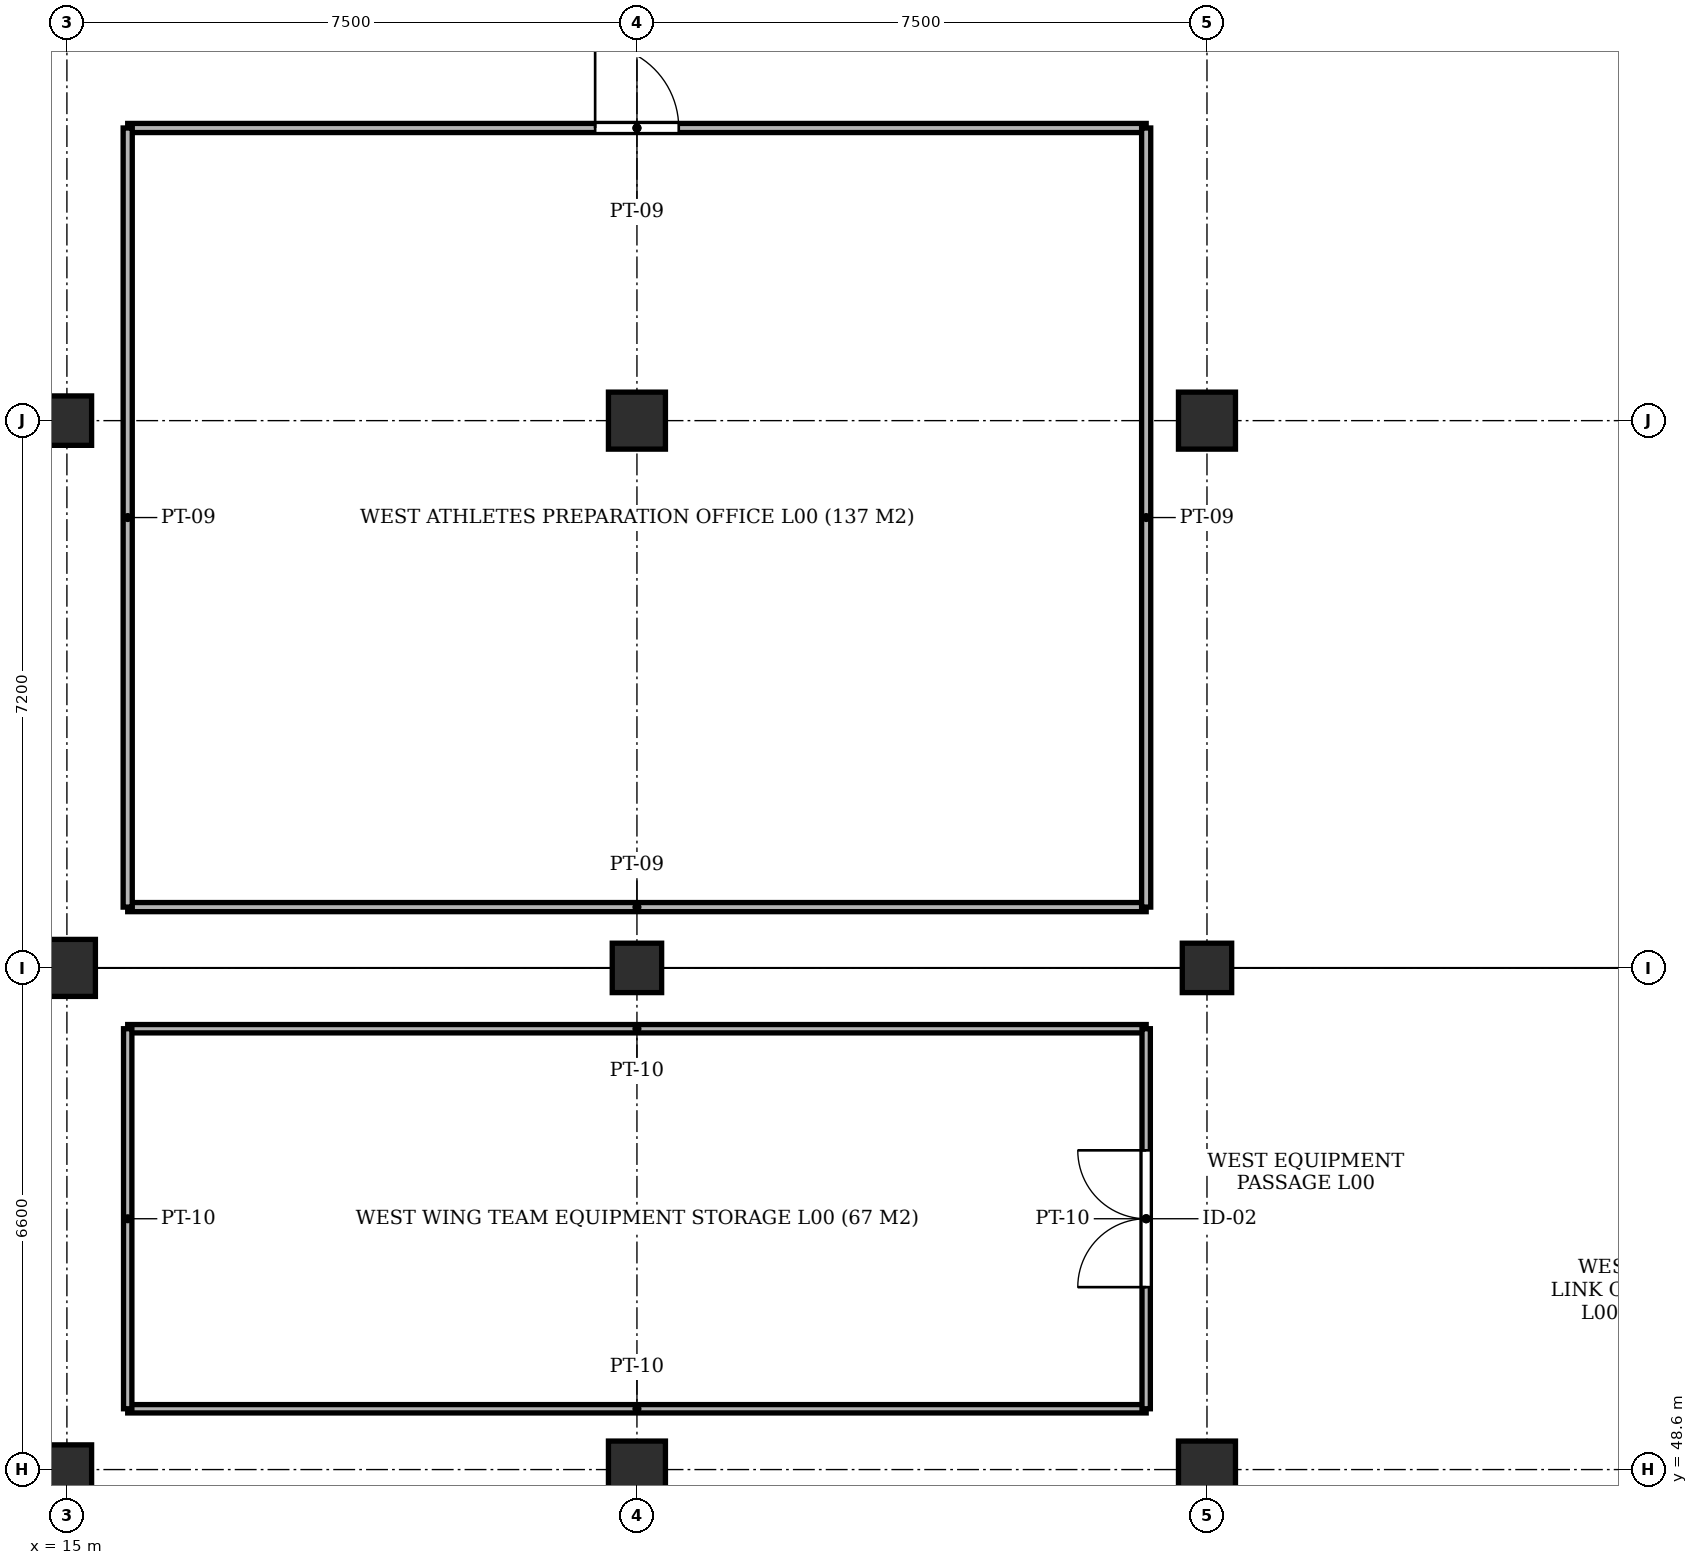
"""IFC4 building model, lengths in metres.
Left out: names, types, materials, properties, quantities, classifications, styles, units other than length and angle.
Written with IfcOpenShell. Run it as: python <this file> out.ifc"""

import sys

from ifc_helpers import new_model, si_unit, direction, frame, frame_2d, origin, origin_2d, place, context, subcontext, project, spatial, rectangle, extrude, element, fill, save


model = new_model("IFC4")
c1 = context("Model", 3, precision=1e-05, world=origin(), true_north=direction((0.0, 1.0)))
c2 = subcontext(c1, "Body", "Model", "MODEL_VIEW")
j1 = project(units=[si_unit("LENGTHUNIT", "METRE"), si_unit("PLANEANGLEUNIT", "RADIAN")], contexts=[c1])
p1 = place(None, origin())
s1 = spatial("IfcSite", under=j1, at=p1, CompositionType="ELEMENT")
p2 = place(p1, origin())
s2 = spatial("IfcBuilding", under=s1, at=p2, CompositionType="ELEMENT")
p3 = place(p2, origin())
s3 = spatial("IfcBuildingStorey", under=s2, at=p3, CompositionType="ELEMENT", Elevation=0.0)
p4 = place(p3, frame((15.0, 48.6, -0.35), z_axis=(0.0, 0.0, 1.0), x_axis=(1.0, 0.0, 0.0)))
e1 = element("IfcColumn", 1, at=p4, inside=s3, PredefinedType="COLUMN", context=c2, shape_type="SweptSolid", body=[
    extrude(rectangle(XDim=0.65, YDim=0.65, at=origin_2d()), origin(), (0.0, 0.0, 1.0), 4.65),
])
p5 = place(p3, frame((15.0, 55.2, -0.35), z_axis=(0.0, 0.0, 1.0), x_axis=(1.0, 0.0, 0.0)))
e2 = element("IfcColumn", 2, at=p5, inside=s3, PredefinedType="COLUMN", context=c2, shape_type="SweptSolid", body=[
    extrude(rectangle(XDim=0.75, YDim=0.75, at=origin_2d()), origin(), (0.0, 0.0, 1.0), 4.65),
])
p6 = place(p3, frame((15.0, 62.4, -0.35), z_axis=(0.0, 0.0, 1.0), x_axis=(1.0, 0.0, 0.0)))
e3 = element("IfcColumn", 3, at=p6, inside=s3, PredefinedType="COLUMN", context=c2, shape_type="SweptSolid", body=[
    extrude(rectangle(XDim=0.65, YDim=0.65, at=origin_2d()), origin(), (0.0, 0.0, 1.0), 4.65),
])
p7 = place(p3, frame((22.5, 48.6, -0.35), z_axis=(0.0, 0.0, 1.0), x_axis=(1.0, 0.0, 0.0)))
e4 = element("IfcColumn", 4, at=p7, inside=s3, PredefinedType="COLUMN", context=c2, shape_type="SweptSolid", body=[
    extrude(rectangle(XDim=0.75, YDim=0.75, at=origin_2d()), origin(), (0.0, 0.0, 1.0), 4.65),
])
p8 = place(p3, frame((22.5, 55.2, -0.35), z_axis=(0.0, 0.0, 1.0), x_axis=(1.0, 0.0, 0.0)))
e5 = element("IfcColumn", 5, at=p8, inside=s3, PredefinedType="COLUMN", context=c2, shape_type="SweptSolid", body=[
    extrude(rectangle(XDim=0.65, YDim=0.65, at=origin_2d()), origin(), (0.0, 0.0, 1.0), 4.65),
])
for number, where, z_axis, x_axis in (
    (6, (22.5, 62.4, -0.35), (0.0, 0.0, 1.0), (1.0, 0.0, 0.0)),
    (7, (30.0, 48.6, -0.35), (0.0, 0.0, 1.0), (1.0, 0.0, 0.0)),
):
    element("IfcColumn", number, at=place(p3, frame(where, z_axis=z_axis, x_axis=x_axis)), inside=s3, PredefinedType="COLUMN", context=c2, shape_type="SweptSolid", body=[
        extrude(rectangle(XDim=0.75, YDim=0.75, at=origin_2d()), origin(), (0.0, 0.0, 1.0), 4.65),
    ])
p9 = place(p3, frame((30.0, 55.2, -0.35), z_axis=(0.0, 0.0, 1.0), x_axis=(1.0, 0.0, 0.0)))
e8 = element("IfcColumn", 8, at=p9, inside=s3, PredefinedType="COLUMN", context=c2, shape_type="SweptSolid", body=[
    extrude(rectangle(XDim=0.65, YDim=0.65, at=origin_2d()), origin(), (0.0, 0.0, 1.0), 4.65),
])
p10 = place(p3, frame((30.0, 62.4, -0.35), z_axis=(0.0, 0.0, 1.0), x_axis=(1.0, 0.0, 0.0)))
e9 = element("IfcColumn", 9, at=p10, inside=s3, PredefinedType="COLUMN", context=c2, shape_type="SweptSolid", body=[
    extrude(rectangle(XDim=0.75, YDim=0.75, at=origin_2d()), origin(), (0.0, 0.0, 1.0), 4.65),
])
for number, where, z_axis, x_axis in (
    (10, (15.8, 49.4, 0.0), (0.0, 0.0, 1.0), (1.0, 0.0, 0.0)),
    (11, (15.8, 54.4, 0.0), (0.0, 0.0, 1.0), (1.0, 0.0, 0.0)),
):
    element("IfcWall", number, at=place(p3, frame(where, z_axis=z_axis, x_axis=x_axis)), inside=s3, PredefinedType="PARTITIONING", context=c2, shape_type="SweptSolid", body=[
        extrude(rectangle(XDim=13.4, YDim=0.11, at=frame_2d((6.7, 0.0))), origin(), (0.0, 0.0, 1.0), 3.88),
    ])
p11 = place(p3, frame((15.8, 49.4, 0.0), z_axis=(0.0, 0.0, 1.0), x_axis=(0.0, 1.0, 0.0)))
e12 = element("IfcWall", 12, at=p11, inside=s3, PredefinedType="PARTITIONING", context=c2, shape_type="SweptSolid", body=[
    extrude(rectangle(XDim=5.0, YDim=0.11, at=frame_2d((2.5, 0.0))), origin(), (0.0, 0.0, 1.0), 3.88),
])
p12 = place(p3, frame((29.2, 49.4, 0.0), z_axis=(0.0, 0.0, 1.0), x_axis=(0.0, 1.0, 0.0)))
e13 = element("IfcWall", 13, at=p12, inside=s3, PredefinedType="PARTITIONING", context=c2, shape_type="SweptSolid", body=[
    extrude(rectangle(XDim=5.0, YDim=0.11, at=frame_2d((2.5, 0.0))), origin(), (0.0, 0.0, 1.0), 3.88),
])
p13 = place(p12, frame((1.6, 0.0, 0.0)))
e14 = element("IfcOpeningElement", 14, at=p13, cuts=e13, PredefinedType="OPENING", context=c2, shape_type="SweptSolid", body=[
    extrude(rectangle(XDim=1.8, YDim=2.25, at=frame_2d((0.9, 1.125))), frame((0.0, 0.067, 0.0), z_axis=(0.0, -1.0, 0.0), x_axis=(1.0, 0.0, 0.0)), (0.0, 0.0, 1.0), 0.134),
])
p14 = place(p3, frame((15.8, 56.0, 0.0), z_axis=(0.0, 0.0, 1.0), x_axis=(1.0, 0.0, 0.0)))
e15 = element("IfcWall", 15, at=p14, inside=s3, PredefinedType="PARTITIONING", context=c2, shape_type="SweptSolid", body=[
    extrude(rectangle(XDim=13.4, YDim=0.12, at=frame_2d((6.7, 0.0))), origin(), (0.0, 0.0, 1.0), 3.88),
])
p15 = place(p3, frame((15.8, 66.25, 0.0), z_axis=(0.0, 0.0, 1.0), x_axis=(1.0, 0.0, 0.0)))
e16 = element("IfcWall", 16, at=p15, inside=s3, PredefinedType="PARTITIONING", context=c2, shape_type="SweptSolid", body=[
    extrude(rectangle(XDim=13.4, YDim=0.12, at=frame_2d((6.7, 0.0))), origin(), (0.0, 0.0, 1.0), 3.88),
])
p16 = place(p15, frame((6.15, 0.0, 0.0)))
e17 = element("IfcOpeningElement", 17, at=p16, cuts=e16, PredefinedType="OPENING", context=c2, shape_type="SweptSolid", body=[
    extrude(rectangle(XDim=1.1, YDim=2.15, at=frame_2d((0.55, 1.075))), frame((0.0, 0.072, 0.0), z_axis=(0.0, -1.0, 0.0), x_axis=(1.0, 0.0, 0.0)), (0.0, 0.0, 1.0), 0.144),
])
for number, where, z_axis, x_axis in (
    (18, (15.8, 56.0, 0.0), (0.0, 0.0, 1.0), (0.0, 1.0, 0.0)),
    (19, (29.2, 56.0, 0.0), (0.0, 0.0, 1.0), (0.0, 1.0, 0.0)),
):
    element("IfcWall", number, at=place(p3, frame(where, z_axis=z_axis, x_axis=x_axis)), inside=s3, PredefinedType="PARTITIONING", context=c2, shape_type="SweptSolid", body=[
        extrude(rectangle(XDim=10.25, YDim=0.12, at=frame_2d((5.125, 0.0))), origin(), (0.0, 0.0, 1.0), 3.88),
    ])
p17 = place(p13, origin())
e20 = element("IfcDoor", 20, at=p17, inside=s3, OperationType="DOUBLE_DOOR_SINGLE_SWING", PredefinedType="DOOR", context=c2, shape_type="SweptSolid", body=[
    extrude(rectangle(XDim=1.8, YDim=2.25, at=frame_2d((0.9, 1.125))), frame((0.0, 0.025, 0.0), z_axis=(0.0, -1.0, 0.0), x_axis=(1.0, 0.0, 0.0)), (0.0, 0.0, 1.0), 0.05),
])
fill(e14, e20)
p18 = place(p16, origin())
e21 = element("IfcDoor", 21, at=p18, inside=s3, OperationType="SINGLE_SWING_LEFT", PredefinedType="DOOR", context=c2, shape_type="SweptSolid", body=[
    extrude(rectangle(XDim=1.1, YDim=2.15, at=frame_2d((0.55, 1.075))), frame((0.0, 0.025, 0.0), z_axis=(0.0, -1.0, 0.0), x_axis=(1.0, 0.0, 0.0)), (0.0, 0.0, 1.0), 0.05),
])
fill(e17, e21)
save(model, sys.argv[1])
